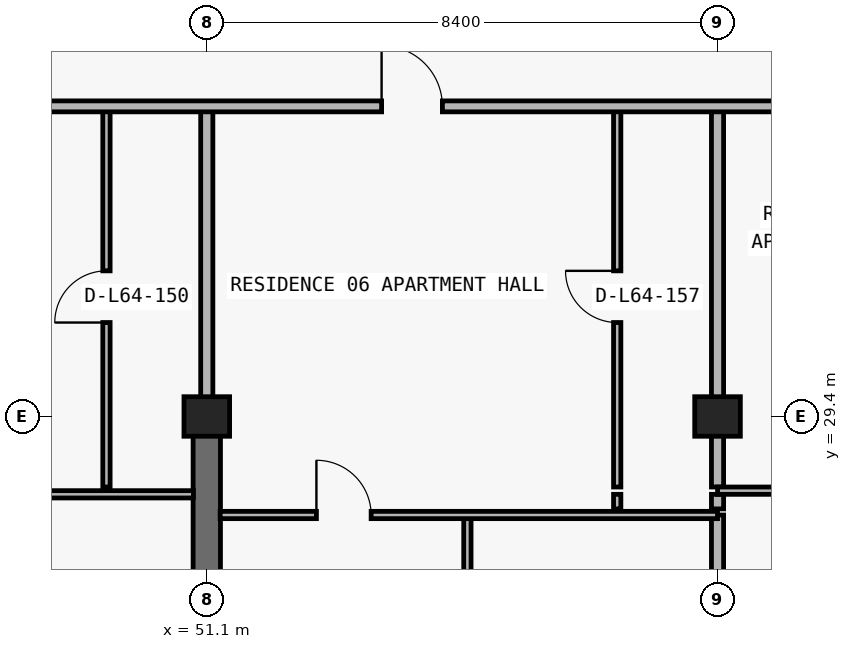
"""IFC4 building model, lengths in metres.
Left out: names, types, materials, properties, quantities, classifications, styles, units other than length and angle.
Written with IfcOpenShell. Run it as: python <this file> out.ifc"""

import sys

from ifc_helpers import new_model, si_unit, direction, frame, frame_2d, origin, origin_2d, place, context, subcontext, project, spatial, rectangle, extrude, element, fill, save


model = new_model("IFC4")
c1 = context("Model", 3, precision=1e-05, world=origin(), true_north=direction((0.0, 1.0)))
c2 = subcontext(c1, "Body", "Model", "MODEL_VIEW")
j1 = project(units=[si_unit("LENGTHUNIT", "METRE"), si_unit("PLANEANGLEUNIT", "RADIAN")], contexts=[c1])
p1 = place(None, origin())
s1 = spatial("IfcSite", under=j1, at=p1, CompositionType="ELEMENT")
p2 = place(p1, origin())
s2 = spatial("IfcBuilding", under=s1, at=p2, CompositionType="ELEMENT")
p3 = place(p2, frame((0.0, 0.0, 229.8)))
s3 = spatial("IfcBuildingStorey", under=s2, at=p3, CompositionType="ELEMENT", Elevation=229.8)
for number, where, z_axis, x_axis in (
    (1, (51.1, 29.4, 0.0), (0.0, 0.0, 1.0), (1.0, 0.0, 0.0)),
    (2, (59.5, 29.4, 0.0), (0.0, 0.0, 1.0), (1.0, 0.0, 0.0)),
):
    element("IfcColumn", number, at=place(p3, frame(where, z_axis=z_axis, x_axis=x_axis)), inside=s3, PredefinedType="COLUMN", context=c2, shape_type="SweptSolid", body=[
        extrude(rectangle(XDim=0.75, YDim=0.65, at=origin_2d()), origin(), (0.0, 0.0, 1.0), 3.05),
    ])
p4 = place(p3, frame((51.1, 20.8, 0.0), z_axis=(0.0, 0.0, 1.0), x_axis=(0.0, 1.0, 0.0)))
e3 = element("IfcWall", 3, at=p4, inside=s3, PredefinedType="SHEAR", context=c2, shape_type="SweptSolid", body=[
    extrude(rectangle(XDim=8.6, YDim=0.45, at=frame_2d((4.3, 0.0))), origin(), (0.0, 0.0, 1.0), 3.05),
])
p5 = place(p3, frame((49.45, 28.24, 0.0), z_axis=(0.0, 0.0, 1.0), x_axis=(0.0, 1.0, 0.0)))
e4 = element("IfcWall", 4, at=p5, inside=s3, PredefinedType="PARTITIONING", context=c2, shape_type="SweptSolid", body=[
    extrude(rectangle(XDim=6.26, YDim=0.12, at=frame_2d((3.13, 0.0))), origin(), (0.0, 0.0, 1.0), 3.05),
])
p6 = place(p5, frame((2.705, 0.0, 0.0)))
e5 = element("IfcOpeningElement", 5, at=p6, cuts=e4, PredefinedType="OPENING", context=c2, shape_type="SweptSolid", body=[
    extrude(rectangle(XDim=0.85, YDim=2.1, at=frame_2d((0.425, 1.05))), frame((0.0, 0.07, 0.0), z_axis=(0.0, -1.0, 0.0), x_axis=(1.0, 0.0, 0.0)), (0.0, 0.0, 1.0), 0.14),
])
p7 = place(p3, frame((51.1, 29.405, 0.0), z_axis=(0.0, 0.0, 1.0), x_axis=(0.0, 1.0, 0.0)))
e6 = element("IfcWall", 6, at=p7, inside=s3, PredefinedType="PARTITIONING", context=c2, shape_type="SweptSolid", body=[
    extrude(rectangle(XDim=5.095, YDim=0.2, at=frame_2d((2.547, 0.0))), origin(), (0.0, 0.0, 1.0), 2.335),
])
p8 = place(p3, frame((55.386, 23.09, 0.0), z_axis=(0.0, 0.0, 1.0), x_axis=(0.0, 1.0, 0.0)))
e7 = element("IfcWall", 7, at=p8, inside=s3, PredefinedType="PARTITIONING", context=c2, shape_type="SweptSolid", body=[
    extrude(rectangle(XDim=4.69, YDim=0.12, at=frame_2d((2.345, 0.0))), origin(), (0.0, 0.0, 1.0), 3.05),
])
p9 = place(p8, frame((1.895, 0.0, 0.0)))
e8 = element("IfcOpeningElement", 8, at=p9, cuts=e7, PredefinedType="OPENING", context=c2, shape_type="SweptSolid", body=[
    extrude(rectangle(XDim=0.9, YDim=2.15, at=frame_2d((0.45, 1.075))), frame((0.0, 0.07, 0.0), z_axis=(0.0, -1.0, 0.0), x_axis=(1.0, 0.0, 0.0)), (0.0, 0.0, 1.0), 0.14),
])
p10 = place(p3, frame((57.85, 27.88, 0.0), z_axis=(0.0, 0.0, 1.0), x_axis=(0.0, 1.0, 0.0)))
e9 = element("IfcWall", 9, at=p10, inside=s3, PredefinedType="PARTITIONING", context=c2, shape_type="SweptSolid", body=[
    extrude(rectangle(XDim=0.24, YDim=0.12, at=frame_2d((0.12, 0.0))), origin(), (0.0, 0.0, 1.0), 3.05),
])
p11 = place(p3, frame((57.85, 28.24, 0.0), z_axis=(0.0, 0.0, 1.0), x_axis=(0.0, 1.0, 0.0)))
e10 = element("IfcWall", 10, at=p11, inside=s3, PredefinedType="PARTITIONING", context=c2, shape_type="SweptSolid", body=[
    extrude(rectangle(XDim=6.26, YDim=0.12, at=frame_2d((3.13, 0.0))), origin(), (0.0, 0.0, 1.0), 3.05),
])
p12 = place(p11, frame((2.705, 0.0, 0.0)))
e11 = element("IfcOpeningElement", 11, at=p12, cuts=e10, PredefinedType="OPENING", context=c2, shape_type="SweptSolid", body=[
    extrude(rectangle(XDim=0.85, YDim=2.1, at=frame_2d((0.425, 1.05))), frame((0.0, 0.07, 0.0), z_axis=(0.0, -1.0, 0.0), x_axis=(1.0, 0.0, 0.0)), (0.0, 0.0, 1.0), 0.14),
])
p13 = place(p3, frame((59.5, 23.09, 0.0), z_axis=(0.0, 0.0, 1.0), x_axis=(0.0, 1.0, 0.0)))
e12 = element("IfcWall", 12, at=p13, inside=s3, PredefinedType="PARTITIONING", context=c2, shape_type="SweptSolid", body=[
    extrude(rectangle(XDim=4.69, YDim=0.2, at=frame_2d((2.345, 0.0))), origin(), (0.0, 0.0, 1.0), 2.263),
])
p14 = place(p3, frame((59.5, 27.88, 0.0), z_axis=(0.0, 0.0, 1.0), x_axis=(0.0, 1.0, 0.0)))
e13 = element("IfcWall", 13, at=p14, inside=s3, PredefinedType="PARTITIONING", context=c2, shape_type="SweptSolid", body=[
    extrude(rectangle(XDim=0.24, YDim=0.2, at=frame_2d((0.12, 0.0))), origin(), (0.0, 0.0, 1.0), 2.263),
])
p15 = place(p3, frame((59.5, 28.24, 0.0), z_axis=(0.0, 0.0, 1.0), x_axis=(0.0, 1.0, 0.0)))
e14 = element("IfcWall", 14, at=p15, inside=s3, PredefinedType="PARTITIONING", context=c2, shape_type="SweptSolid", body=[
    extrude(rectangle(XDim=6.26, YDim=0.2, at=frame_2d((3.13, 0.0))), origin(), (0.0, 0.0, 1.0), 2.263),
])
p16 = place(p3, frame((51.32, 27.78, 0.0), z_axis=(0.0, 0.0, 1.0), x_axis=(1.0, 0.0, 0.0)))
e15 = element("IfcWall", 15, at=p16, inside=s3, PredefinedType="PARTITIONING", context=c2, shape_type="SweptSolid", body=[
    extrude(rectangle(XDim=8.18, YDim=0.12, at=frame_2d((4.09, 0.0))), origin(), (0.0, 0.0, 1.0), 3.05),
])
p17 = place(p16, frame((1.583, 0.0, 0.0)))
e16 = element("IfcOpeningElement", 16, at=p17, cuts=e15, PredefinedType="OPENING", context=c2, shape_type="SweptSolid", body=[
    extrude(rectangle(XDim=0.9, YDim=2.15, at=frame_2d((0.45, 1.075))), frame((0.0, 0.07, 0.0), z_axis=(0.0, -1.0, 0.0), x_axis=(1.0, 0.0, 0.0)), (0.0, 0.0, 1.0), 0.14),
])
p18 = place(p3, frame((42.7, 28.12, 0.0), z_axis=(0.0, 0.0, 1.0), x_axis=(1.0, 0.0, 0.0)))
e17 = element("IfcWall", 17, at=p18, inside=s3, PredefinedType="PARTITIONING", context=c2, shape_type="SweptSolid", body=[
    extrude(rectangle(XDim=8.18, YDim=0.12, at=frame_2d((4.09, 0.0))), origin(), (0.0, 0.0, 1.0), 3.05),
])
p19 = place(p18, frame((1.943, 0.0, 0.0)))
e18 = element("IfcOpeningElement", 18, at=p19, cuts=e17, PredefinedType="OPENING", context=c2, shape_type="SweptSolid", body=[
    extrude(rectangle(XDim=0.9, YDim=2.15, at=frame_2d((0.45, 1.075))), frame((0.0, 0.07, 0.0), z_axis=(0.0, -1.0, 0.0), x_axis=(1.0, 0.0, 0.0)), (0.0, 0.0, 1.0), 0.14),
])
p20 = place(p3, frame((59.5, 28.18, 0.0), z_axis=(0.0, 0.0, 1.0), x_axis=(1.0, 0.0, 0.0)))
e19 = element("IfcWall", 19, at=p20, inside=s3, PredefinedType="PARTITIONING", context=c2, shape_type="SweptSolid", body=[
    extrude(rectangle(XDim=6.2, YDim=0.12, at=frame_2d((3.1, 0.0))), origin(), (0.0, 0.0, 1.0), 3.05),
])
p21 = place(p20, frame((1.825, 0.0, 0.0)))
e20 = element("IfcOpeningElement", 20, at=p21, cuts=e19, PredefinedType="OPENING", context=c2, shape_type="SweptSolid", body=[
    extrude(rectangle(XDim=0.9, YDim=2.15, at=frame_2d((0.45, 1.075))), frame((0.0, 0.07, 0.0), z_axis=(0.0, -1.0, 0.0), x_axis=(1.0, 0.0, 0.0)), (0.0, 0.0, 1.0), 0.14),
])
p22 = place(p3, frame((39.28, 34.5, 0.0), z_axis=(0.0, 0.0, 1.0), x_axis=(1.0, 0.0, 0.0)))
e21 = element("IfcWall", 21, at=p22, inside=s3, PredefinedType="PARTITIONING", context=c2, shape_type="SweptSolid", body=[
    extrude(rectangle(XDim=26.42, YDim=0.18, at=frame_2d((13.21, 0.0))), origin(), (0.0, 0.0, 1.0), 3.05),
])
p23 = place(p22, frame((6.295, 0.0, 0.0)))
e22 = element("IfcOpeningElement", 22, at=p23, cuts=e21, PredefinedType="OPENING", context=c2, shape_type="SweptSolid", body=[
    extrude(rectangle(XDim=1.0, YDim=2.2, at=frame_2d((0.5, 1.1))), frame((0.0, 0.1, 0.0), z_axis=(0.0, -1.0, 0.0), x_axis=(1.0, 0.0, 0.0)), (0.0, 0.0, 1.0), 0.2),
])
p24 = place(p22, frame((14.695, 0.0, 0.0)))
e23 = element("IfcOpeningElement", 23, at=p24, cuts=e21, PredefinedType="OPENING", context=c2, shape_type="SweptSolid", body=[
    extrude(rectangle(XDim=1.0, YDim=2.2, at=frame_2d((0.5, 1.1))), frame((0.0, 0.1, 0.0), z_axis=(0.0, -1.0, 0.0), x_axis=(1.0, 0.0, 0.0)), (0.0, 0.0, 1.0), 0.2),
])
p25 = place(p22, frame((21.995, 0.0, 0.0)))
e24 = element("IfcOpeningElement", 24, at=p25, cuts=e21, PredefinedType="OPENING", context=c2, shape_type="SweptSolid", body=[
    extrude(rectangle(XDim=1.0, YDim=2.2, at=frame_2d((0.5, 1.1))), frame((0.0, 0.1, 0.0), z_axis=(0.0, -1.0, 0.0), x_axis=(1.0, 0.0, 0.0)), (0.0, 0.0, 1.0), 0.2),
])
p26 = place(p6, origin())
e25 = element("IfcDoor", 25, at=p26, inside=s3, OperationType="SINGLE_SWING_LEFT", PredefinedType="DOOR", context=c2, shape_type="SweptSolid", body=[
    extrude(rectangle(XDim=0.85, YDim=2.1, at=frame_2d((0.425, 1.05))), frame((0.0, 0.025, 0.0), z_axis=(0.0, -1.0, 0.0), x_axis=(1.0, 0.0, 0.0)), (0.0, 0.0, 1.0), 0.05),
])
fill(e5, e25)
p27 = place(p24, origin())
e26 = element("IfcDoor", 26, at=p27, inside=s3, OperationType="SINGLE_SWING_LEFT", PredefinedType="DOOR", context=c2, shape_type="SweptSolid", body=[
    extrude(rectangle(XDim=1.0, YDim=2.2, at=frame_2d((0.5, 1.1))), frame((0.0, 0.025, 0.0), z_axis=(0.0, -1.0, 0.0), x_axis=(1.0, 0.0, 0.0)), (0.0, 0.0, 1.0), 0.05),
])
fill(e23, e26)
p28 = place(p12, origin())
e27 = element("IfcDoor", 27, at=p28, inside=s3, OperationType="SINGLE_SWING_RIGHT", PredefinedType="DOOR", context=c2, shape_type="SweptSolid", body=[
    extrude(rectangle(XDim=0.85, YDim=2.1, at=frame_2d((0.425, 1.05))), frame((0.0, 0.025, 0.0), z_axis=(0.0, -1.0, 0.0), x_axis=(1.0, 0.0, 0.0)), (0.0, 0.0, 1.0), 0.05),
])
fill(e11, e27)
p29 = place(p17, origin())
e28 = element("IfcDoor", 28, at=p29, inside=s3, OperationType="SINGLE_SWING_LEFT", PredefinedType="DOOR", context=c2, shape_type="SweptSolid", body=[
    extrude(rectangle(XDim=0.9, YDim=2.15, at=frame_2d((0.45, 1.075))), frame((0.0, 0.025, 0.0), z_axis=(0.0, -1.0, 0.0), x_axis=(1.0, 0.0, 0.0)), (0.0, 0.0, 1.0), 0.05),
])
fill(e16, e28)
save(model, sys.argv[1])
